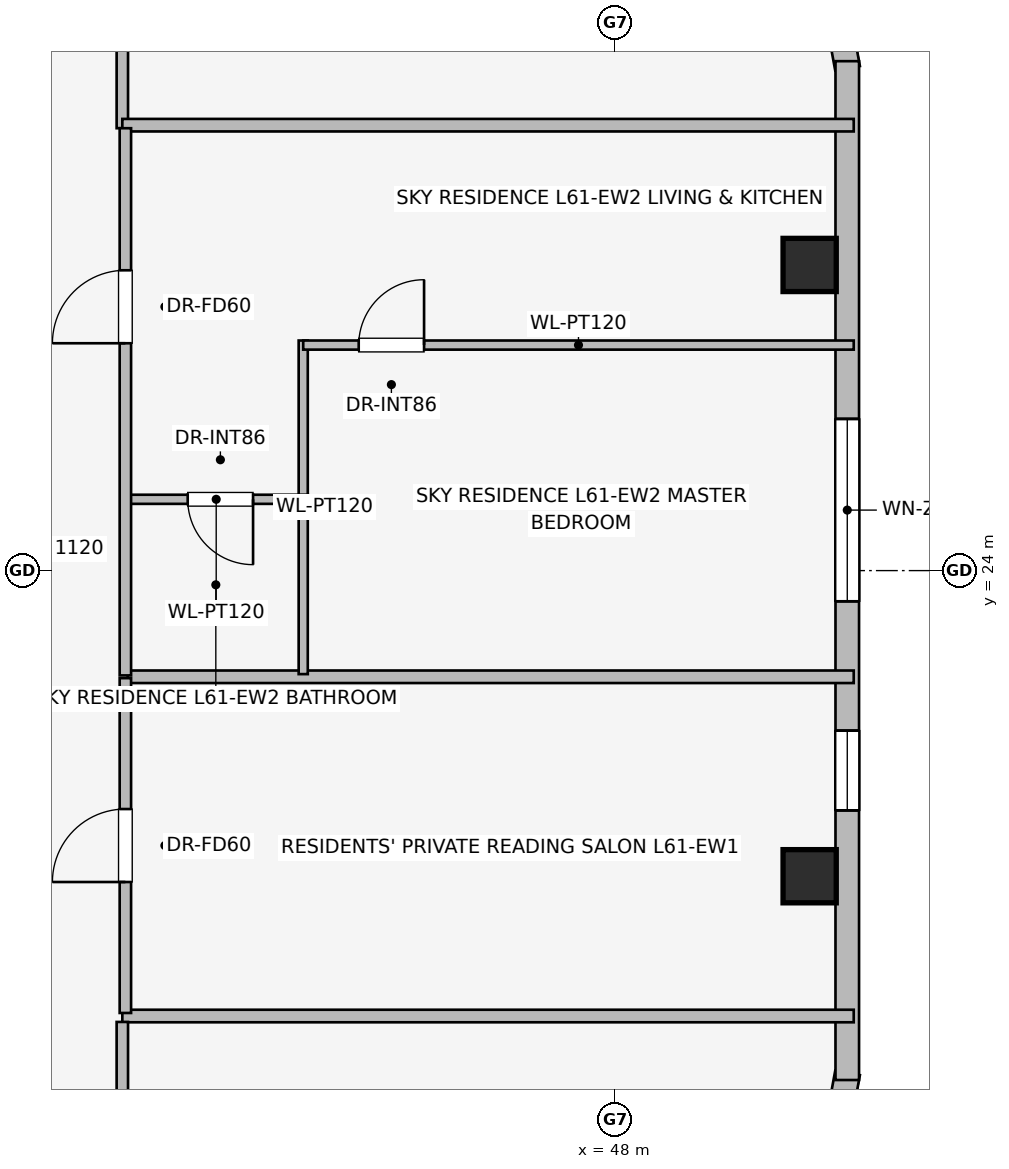
"""IFC4 building model, lengths in metres.
Left out: names, types, materials, properties, quantities, classifications, styles, units other than length and angle.
Written with IfcOpenShell. Run it as: python <this file> out.ifc"""

import sys

from ifc_helpers import new_model, si_unit, direction, frame, frame_2d, origin, origin_2d, place, context, subcontext, project, spatial, rectangle, extrude, element, fill, save


model = new_model("IFC4")
c1 = context("Model", 3, precision=1e-05, world=origin(), true_north=direction((0.0, 1.0)))
c2 = subcontext(c1, "Body", "Model", "MODEL_VIEW")
j1 = project(units=[si_unit("LENGTHUNIT", "METRE"), si_unit("PLANEANGLEUNIT", "RADIAN")], contexts=[c1])
p1 = place(None, origin())
s1 = spatial("IfcSite", under=j1, at=p1, CompositionType="ELEMENT")
p2 = place(p1, origin())
s2 = spatial("IfcBuilding", under=s1, at=p2, CompositionType="ELEMENT")
p3 = place(p2, frame((0.0, 0.0, 224.15)))
s3 = spatial("IfcBuildingStorey", under=s2, at=p3, CompositionType="ELEMENT", Elevation=224.15)
for number, where, z_axis, x_axis in (
    (1, (50.563, 19.979, 0.0), (0.0, 0.0, 1.0), (1.0, 0.0, 0.0)),
    (2, (50.563, 28.021, 0.0), (0.0, 0.0, 1.0), (1.0, 0.0, 0.0)),
):
    element("IfcColumn", number, at=place(p3, frame(where, z_axis=z_axis, x_axis=x_axis)), inside=s3, PredefinedType="COLUMN", context=c2, shape_type="SweptSolid", body=[
        extrude(rectangle(XDim=0.7, YDim=0.7, at=origin_2d()), origin(), (0.0, 0.0, 1.0), 3.55),
    ])
for number, where, z_axis, x_axis in (
    (3, (50.759, 32.257, 0.0), (0.0, 0.0, 1.0), (0.181, -0.984, 0.0)),
    (4, (51.062, 17.392, 0.0), (0.0, 0.0, 1.0), (-0.181, -0.984, 0.0)),
):
    element("IfcWall", number, at=place(p3, frame(where, z_axis=z_axis, x_axis=x_axis)), inside=s3, PredefinedType="STANDARD", context=c2, shape_type="SweptSolid", body=[
        extrude(rectangle(XDim=1.677, YDim=0.33, at=frame_2d((0.838, 0.0))), origin(), (0.0, 0.0, 1.0), 3.29),
    ])
p4 = place(p3, frame((51.058, 30.702, 0.0), z_axis=(0.0, 0.0, 1.0), x_axis=(0.0, -1.0, 0.0)))
e5 = element("IfcWall", 5, at=p4, inside=s3, PredefinedType="STANDARD", context=c2, shape_type="SweptSolid", body=[
    extrude(rectangle(XDim=13.404, YDim=0.31, at=frame_2d((6.702, 0.0))), origin(), (0.0, 0.0, 1.0), 3.29),
])
p5 = place(p4, frame((4.706, 0.0, 0.75)))
e6 = element("IfcOpeningElement", 6, at=p5, cuts=e5, PredefinedType="OPENING", context=c2, shape_type="SweptSolid", body=[
    extrude(rectangle(XDim=2.4, YDim=1.6, at=frame_2d((1.2, 0.8))), frame((0.0, 0.165, 0.0), z_axis=(0.0, -1.0, 0.0), x_axis=(1.0, 0.0, 0.0)), (0.0, 0.0, 1.0), 0.33),
])
p6 = place(p4, frame((8.807, 0.0, 0.75)))
e7 = element("IfcOpeningElement", 7, at=p6, cuts=e5, PredefinedType="OPENING", context=c2, shape_type="SweptSolid", body=[
    extrude(rectangle(XDim=1.05, YDim=1.4, at=frame_2d((0.525, 0.7))), frame((0.0, 0.165, 0.0), z_axis=(0.0, -1.0, 0.0), x_axis=(1.0, 0.0, 0.0)), (0.0, 0.0, 1.0), 0.33),
])
p7 = place(p3, frame((41.52, 29.82, 0.0), z_axis=(0.0, 0.0, 1.0), x_axis=(0.0, 1.0, 0.0)))
e8 = element("IfcWall", 8, at=p7, inside=s3, PredefinedType="PARTITIONING", context=c2, shape_type="SweptSolid", body=[
    extrude(rectangle(XDim=1.72, YDim=0.15, at=frame_2d((0.86, 0.0))), origin(), (0.0, 0.0, 1.0), 3.29),
])
for number, where, z_axis, x_axis in (
    (9, (41.52, 18.14, 0.0), (0.0, 0.0, 1.0), (1.0, 0.0, 0.0)),
    (10, (41.52, 29.86, 0.0), (0.0, 0.0, 1.0), (1.0, 0.0, 0.0)),
):
    element("IfcWall", number, at=place(p3, frame(where, z_axis=z_axis, x_axis=x_axis)), inside=s3, PredefinedType="PARTITIONING", context=c2, shape_type="SweptSolid", body=[
        extrude(rectangle(XDim=9.623, YDim=0.165, at=frame_2d((4.812, 0.0))), origin(), (0.0, 0.0, 1.0), 3.29),
    ])
p8 = place(p3, frame((41.59, 22.603, 0.0), z_axis=(0.0, 0.0, 1.0), x_axis=(1.0, 0.0, 0.0)))
e11 = element("IfcWall", 11, at=p8, inside=s3, PredefinedType="PARTITIONING", context=c2, shape_type="SweptSolid", body=[
    extrude(rectangle(XDim=9.553, YDim=0.165, at=frame_2d((4.776, 0.0))), origin(), (0.0, 0.0, 1.0), 3.29),
])
p9 = place(p3, frame((41.56, 18.18, 0.0), z_axis=(0.0, 0.0, 1.0), x_axis=(0.0, 1.0, 0.0)))
e12 = element("IfcWall", 12, at=p9, inside=s3, PredefinedType="PARTITIONING", context=c2, shape_type="SweptSolid", body=[
    extrude(rectangle(XDim=4.405, YDim=0.15, at=frame_2d((2.203, 0.0))), origin(), (0.0, 0.0, 1.0), 3.29),
])
p10 = place(p9, frame((1.723, 0.0, 0.0)))
e13 = element("IfcOpeningElement", 13, at=p10, cuts=e12, PredefinedType="OPENING", context=c2, shape_type="SweptSolid", body=[
    extrude(rectangle(XDim=0.96, YDim=2.0, at=frame_2d((0.48, 1.0))), frame((0.0, 0.085, 0.0), z_axis=(0.0, -1.0, 0.0), x_axis=(1.0, 0.0, 0.0)), (0.0, 0.0, 1.0), 0.17),
])
p11 = place(p3, frame((43.9, 22.638, 0.0), z_axis=(0.0, 0.0, 1.0), x_axis=(0.0, 1.0, 0.0)))
e14 = element("IfcWall", 14, at=p11, inside=s3, PredefinedType="PARTITIONING", context=c2, shape_type="SweptSolid", body=[
    extrude(rectangle(XDim=4.389, YDim=0.12, at=frame_2d((2.195, 0.0))), origin(), (0.0, 0.0, 1.0), 2.887),
])
p12 = place(p3, frame((43.96, 24.938, 0.0), z_axis=(0.0, 0.0, 1.0), x_axis=(-1.0, 0.0, 0.0)))
e15 = element("IfcWall", 15, at=p12, inside=s3, PredefinedType="PARTITIONING", context=c2, shape_type="SweptSolid", body=[
    extrude(rectangle(XDim=2.41, YDim=0.12, at=frame_2d((1.205, 0.0))), origin(), (0.0, 0.0, 1.0), 3.29),
])
p13 = place(p12, frame((0.72, 0.0, 0.0)))
e16 = element("IfcOpeningElement", 16, at=p13, cuts=e15, PredefinedType="OPENING", context=c2, shape_type="SweptSolid", body=[
    extrude(rectangle(XDim=0.86, YDim=2.0, at=frame_2d((0.43, 1.0))), frame((0.0, 0.07, 0.0), z_axis=(0.0, -1.0, 0.0), x_axis=(1.0, 0.0, 0.0)), (0.0, 0.0, 1.0), 0.14),
])
p14 = place(p3, frame((43.9, 26.967, 0.0), z_axis=(0.0, 0.0, 1.0), x_axis=(1.0, 0.0, 0.0)))
e17 = element("IfcWall", 17, at=p14, inside=s3, PredefinedType="PARTITIONING", context=c2, shape_type="SweptSolid", body=[
    extrude(rectangle(XDim=7.243, YDim=0.12, at=frame_2d((3.622, 0.0))), origin(), (0.0, 0.0, 1.0), 3.29),
])
p15 = place(p14, frame((0.73, 0.0, 0.0)))
e18 = element("IfcOpeningElement", 18, at=p15, cuts=e17, PredefinedType="OPENING", context=c2, shape_type="SweptSolid", body=[
    extrude(rectangle(XDim=0.86, YDim=2.0, at=frame_2d((0.43, 1.0))), frame((0.0, 0.07, 0.0), z_axis=(0.0, -1.0, 0.0), x_axis=(1.0, 0.0, 0.0)), (0.0, 0.0, 1.0), 0.14),
])
p16 = place(p3, frame((41.56, 22.621, 0.0), z_axis=(0.0, 0.0, 1.0), x_axis=(0.0, 1.0, 0.0)))
e19 = element("IfcWall", 19, at=p16, inside=s3, PredefinedType="PARTITIONING", context=c2, shape_type="SweptSolid", body=[
    extrude(rectangle(XDim=7.199, YDim=0.15, at=frame_2d((3.6, 0.0))), origin(), (0.0, 0.0, 1.0), 3.29),
])
p17 = place(p16, frame((4.37, 0.0, 0.0)))
e20 = element("IfcOpeningElement", 20, at=p17, cuts=e19, PredefinedType="OPENING", context=c2, shape_type="SweptSolid", body=[
    extrude(rectangle(XDim=0.96, YDim=2.0, at=frame_2d((0.48, 1.0))), frame((0.0, 0.085, 0.0), z_axis=(0.0, -1.0, 0.0), x_axis=(1.0, 0.0, 0.0)), (0.0, 0.0, 1.0), 0.17),
])
p18 = place(p3, frame((41.52, 16.46, 0.0), z_axis=(0.0, 0.0, 1.0), x_axis=(0.0, 1.0, 0.0)))
e21 = element("IfcWall", 21, at=p18, inside=s3, PredefinedType="PARTITIONING", context=c2, shape_type="SweptSolid", body=[
    extrude(rectangle(XDim=1.602, YDim=0.15, at=frame_2d((0.801, 0.0))), origin(), (0.0, 0.0, 1.0), 3.29),
])
p19 = place(p5, origin())
e22 = element("IfcWindow", 22, at=p19, inside=s3, PartitioningType="SINGLE_PANEL", PredefinedType="WINDOW", context=c2, shape_type="SweptSolid", body=[
    extrude(rectangle(XDim=2.4, YDim=1.6, at=frame_2d((1.2, 0.8))), frame((0.0, 0.03, 0.0), z_axis=(0.0, -1.0, 0.0), x_axis=(1.0, 0.0, 0.0)), (0.0, 0.0, 1.0), 0.06),
])
fill(e6, e22)
p20 = place(p6, origin())
e23 = element("IfcWindow", 23, at=p20, inside=s3, PartitioningType="SINGLE_PANEL", PredefinedType="WINDOW", context=c2, shape_type="SweptSolid", body=[
    extrude(rectangle(XDim=1.05, YDim=1.4, at=frame_2d((0.525, 0.7))), frame((0.0, 0.03, 0.0), z_axis=(0.0, -1.0, 0.0), x_axis=(1.0, 0.0, 0.0)), (0.0, 0.0, 1.0), 0.06),
])
fill(e7, e23)
p21 = place(p10, origin())
e24 = element("IfcDoor", 24, at=p21, inside=s3, OperationType="SINGLE_SWING_LEFT", PredefinedType="DOOR", context=c2, shape_type="SweptSolid", body=[
    extrude(rectangle(XDim=0.96, YDim=2.0, at=frame_2d((0.48, 1.0))), frame((0.0, 0.025, 0.0), z_axis=(0.0, -1.0, 0.0), x_axis=(1.0, 0.0, 0.0)), (0.0, 0.0, 1.0), 0.05),
])
fill(e13, e24)
p22 = place(p13, origin())
e25 = element("IfcDoor", 25, at=p22, inside=s3, OperationType="SINGLE_SWING_LEFT", PredefinedType="DOOR", context=c2, shape_type="SweptSolid", body=[
    extrude(rectangle(XDim=0.86, YDim=2.0, at=frame_2d((0.43, 1.0))), frame((0.0, 0.025, 0.0), z_axis=(0.0, -1.0, 0.0), x_axis=(1.0, 0.0, 0.0)), (0.0, 0.0, 1.0), 0.05),
])
fill(e16, e25)
p23 = place(p15, origin())
e26 = element("IfcDoor", 26, at=p23, inside=s3, OperationType="SINGLE_SWING_RIGHT", PredefinedType="DOOR", context=c2, shape_type="SweptSolid", body=[
    extrude(rectangle(XDim=0.86, YDim=2.0, at=frame_2d((0.43, 1.0))), frame((0.0, 0.025, 0.0), z_axis=(0.0, -1.0, 0.0), x_axis=(1.0, 0.0, 0.0)), (0.0, 0.0, 1.0), 0.05),
])
fill(e18, e26)
p24 = place(p17, origin())
e27 = element("IfcDoor", 27, at=p24, inside=s3, OperationType="SINGLE_SWING_LEFT", PredefinedType="DOOR", context=c2, shape_type="SweptSolid", body=[
    extrude(rectangle(XDim=0.96, YDim=2.0, at=frame_2d((0.48, 1.0))), frame((0.0, 0.025, 0.0), z_axis=(0.0, -1.0, 0.0), x_axis=(1.0, 0.0, 0.0)), (0.0, 0.0, 1.0), 0.05),
])
fill(e20, e27)
save(model, sys.argv[1])
